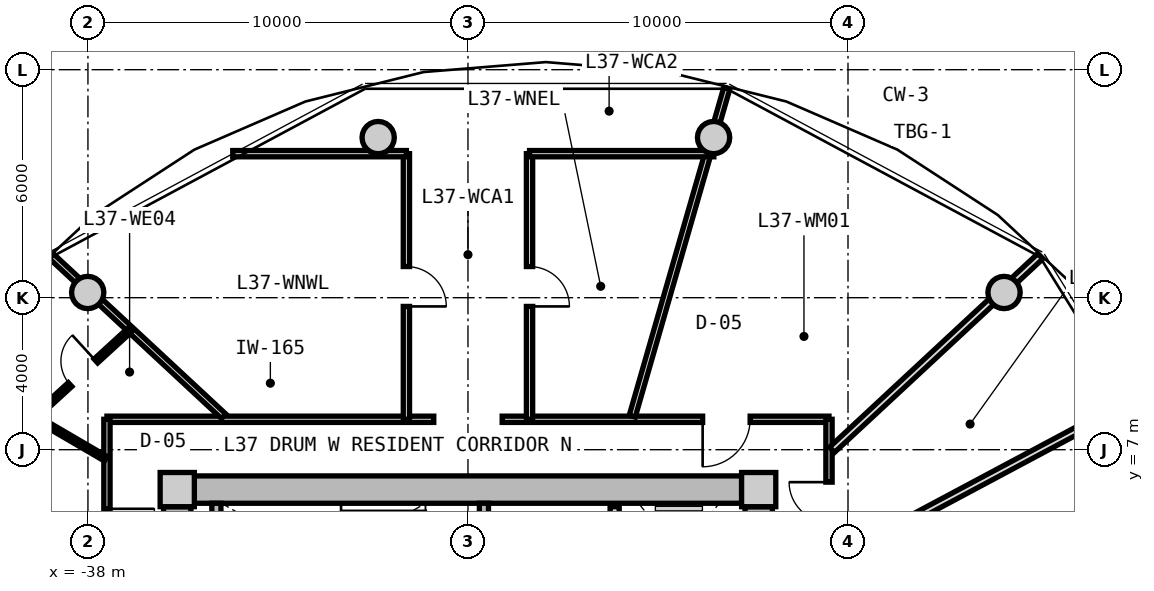
"""IFC4 building model, lengths in metres.
Left out: names, types, materials, properties, quantities, classifications, styles, units other than length and angle.
Written with IfcOpenShell. Run it as: python <this file> out.ifc"""

import sys

from ifc_helpers import new_model, si_unit, direction, frame, frame_2d, origin, origin_2d, place, context, subcontext, project, spatial, rectangle, circle, extrude, source, transform, mapped, element, fill, save


model = new_model("IFC4")
c1 = context("Model", 3, precision=1e-05, world=origin(), true_north=direction((0.0, 1.0)))
c2 = subcontext(c1, "Body", "Model", "MODEL_VIEW")
j1 = project(units=[si_unit("LENGTHUNIT", "METRE"), si_unit("PLANEANGLEUNIT", "RADIAN")], contexts=[c1])
p1 = place(None, origin())
s1 = spatial("IfcSite", under=j1, at=p1, CompositionType="ELEMENT")
p2 = place(p1, origin())
s2 = spatial("IfcBuilding", under=s1, at=p2, CompositionType="ELEMENT")
p3 = place(p2, frame((0.0, 0.0, 120.65)))
s3 = spatial("IfcBuildingStorey", under=s2, at=p3, CompositionType="ELEMENT", Elevation=120.65)
m1 = source(origin(), c2, "Body", "SweptSolid", [
    extrude(rectangle(XDim=0.9, YDim=0.9, at=origin_2d()), origin(), (0.0, 0.0, 1.0), 3.05),
])
for number, where, z_axis, x_axis in (
    (1, (-20.35, 5.95, 0.0), (0.0, 0.0, 1.0), (1.0, 0.0, 0.0)),
    (2, (-35.65, 5.95, 0.0), (0.0, 0.0, 1.0), (1.0, 0.0, 0.0)),
):
    element("IfcColumn", number, at=place(p3, frame(where, z_axis=z_axis, x_axis=x_axis)), inside=s3, PredefinedType="COLUMN", context=c2, shape_type="MappedRepresentation", body=[
        mapped(m1, transform((0.0, 0.0, 0.0), x_axis=(1.0, 0.0, 0.0), y_axis=(0.0, 1.0, 0.0), z_axis=(0.0, 0.0, 1.0), scale=1.0)),
    ])
m2 = source(origin(), c2, "Body", "SweptSolid", [
    extrude(rectangle(XDim=14.4, YDim=0.72, at=frame_2d((7.2, 0.0))), origin(), (0.0, 0.0, 1.0), 2.79),
])
p4 = place(p3, frame((-35.2, 5.95, 0.0), z_axis=(0.0, 0.0, 1.0), x_axis=(1.0, 0.0, 0.0)))
e3 = element("IfcWall", 3, at=p4, inside=s3, PredefinedType="SHEAR", context=c2, shape_type="MappedRepresentation", body=[
    mapped(m2, transform((0.0, 0.0, 0.0), x_axis=(1.0, 0.0, 0.0), y_axis=(0.0, 1.0, 0.0), z_axis=(0.0, 0.0, 1.0), scale=1.0)),
])
m3 = source(origin(), c2, "Body", "SweptSolid", [
    extrude(rectangle(XDim=11.0, YDim=0.72, at=frame_2d((5.5, 0.0))), origin(), (0.0, 0.0, 1.0), 2.79),
])
p5 = place(p3, frame((-35.65, -5.5, 0.0), z_axis=(0.0, 0.0, 1.0), x_axis=(0.0, 1.0, 0.0)))
e4 = element("IfcWall", 4, at=p5, inside=s3, PredefinedType="SHEAR", context=c2, shape_type="MappedRepresentation", body=[
    mapped(m3, transform((0.0, 0.0, 0.0), x_axis=(1.0, 0.0, 0.0), y_axis=(0.0, 1.0, 0.0), z_axis=(0.0, 0.0, 1.0), scale=1.0)),
])
p6 = place(p5, frame((3.8, 0.0, 0.0)))
e5 = element("IfcOpeningElement", 5, at=p6, cuts=e4, PredefinedType="OPENING", context=c2, shape_type="SweptSolid", body=[
    extrude(rectangle(XDim=1.2, YDim=2.15, at=frame_2d((0.6, 1.075))), frame((0.0, 0.37, 0.0), z_axis=(0.0, -1.0, 0.0), x_axis=(1.0, 0.0, 0.0)), (0.0, 0.0, 1.0), 0.74),
])
p7 = place(p3, frame((-20.35, 5.5, 0.0), z_axis=(0.0, 0.0, 1.0), x_axis=(0.0, -1.0, 0.0)))
e6 = element("IfcWall", 6, at=p7, inside=s3, PredefinedType="SHEAR", context=c2, shape_type="MappedRepresentation", body=[
    mapped(m3, transform((0.0, 0.0, 0.0), x_axis=(1.0, 0.0, 0.0), y_axis=(0.0, 1.0, 0.0), z_axis=(0.0, 0.0, 1.0), scale=1.0)),
])
p8 = place(p7, frame((5.65, 0.0, 0.0)))
e7 = element("IfcOpeningElement", 7, at=p8, cuts=e6, PredefinedType="OPENING", context=c2, shape_type="SweptSolid", body=[
    extrude(rectangle(XDim=1.2, YDim=2.15, at=frame_2d((0.6, 1.075))), frame((0.0, 0.37, 0.0), z_axis=(0.0, -1.0, 0.0), x_axis=(1.0, 0.0, 0.0)), (0.0, 0.0, 1.0), 0.74),
])
m4 = source(origin(), c2, "Body", "SweptSolid", [
    extrude(circle(Radius=0.425, at=origin_2d()), origin(), (0.0, 0.0, 1.0), 3.05),
])
for number, where, z_axis, x_axis in (
    (8, (-13.894, 11.137, 0.0), (0.0, 0.0, 1.0), (1.0, 0.0, 0.0)),
    (9, (-21.537, 15.213, 0.0), (0.0, 0.0, 1.0), (1.0, 0.0, 0.0)),
    (10, (-30.363, 15.213, 0.0), (0.0, 0.0, 1.0), (1.0, 0.0, 0.0)),
    (11, (-38.006, 11.137, 0.0), (0.0, 0.0, 1.0), (1.0, 0.0, 0.0)),
):
    element("IfcColumn", number, at=place(p3, frame(where, z_axis=z_axis, x_axis=x_axis)), inside=s3, PredefinedType="COLUMN", context=c2, shape_type="MappedRepresentation", body=[
        mapped(m4, transform((0.0, 0.0, 0.0), x_axis=(1.0, 0.0, 0.0), y_axis=(0.0, 1.0, 0.0), z_axis=(0.0, 0.0, 1.0), scale=1.0)),
    ])
m5 = source(origin(), c2, "Body", "SweptSolid", [
    extrude(rectangle(XDim=3.14, YDim=0.24, at=frame_2d((1.57, 0.0))), origin(), (0.0, 0.0, 1.0), 2.79),
])
p9 = place(p3, frame((-34.62, 2.45, 0.0), z_axis=(0.0, 0.0, 1.0), x_axis=(0.0, 1.0, 0.0)))
e12 = element("IfcWall", 12, at=p9, inside=s3, PredefinedType="PARTITIONING", context=c2, shape_type="MappedRepresentation", body=[
    mapped(m5, transform((0.0, 0.0, 0.0), x_axis=(1.0, 0.0, 0.0), y_axis=(0.0, 1.0, 0.0), z_axis=(0.0, 0.0, 1.0), scale=1.0)),
])
p10 = place(p3, frame((-27.58, 2.45, 0.0), z_axis=(0.0, 0.0, 1.0), x_axis=(0.0, 1.0, 0.0)))
e13 = element("IfcWall", 13, at=p10, inside=s3, PredefinedType="PARTITIONING", context=c2, shape_type="MappedRepresentation", body=[
    mapped(m5, transform((0.0, 0.0, 0.0), x_axis=(1.0, 0.0, 0.0), y_axis=(0.0, 1.0, 0.0), z_axis=(0.0, 0.0, 1.0), scale=1.0)),
])
p11 = place(p10, frame((0.55, 0.0, 0.0)))
e14 = element("IfcOpeningElement", 14, at=p11, cuts=e13, PredefinedType="OPENING", context=c2, shape_type="SweptSolid", body=[
    extrude(rectangle(XDim=1.1, YDim=2.15, at=frame_2d((0.55, 1.075))), frame((0.0, 0.13, 0.0), z_axis=(0.0, -1.0, 0.0), x_axis=(1.0, 0.0, 0.0)), (0.0, 0.0, 1.0), 0.26),
])
m6 = source(origin(), c2, "Body", "SweptSolid", [
    extrude(rectangle(XDim=5.0, YDim=0.24, at=frame_2d((2.5, 0.0))), origin(), (0.0, 0.0, 1.0), 2.775),
])
p12 = place(p3, frame((-24.14, 0.5, 0.0), z_axis=(0.0, 0.0, 1.0), x_axis=(0.0, 1.0, 0.0)))
e15 = element("IfcWall", 15, at=p12, inside=s3, PredefinedType="PARTITIONING", context=c2, shape_type="MappedRepresentation", body=[
    mapped(m6, transform((0.0, 0.0, 0.0), x_axis=(1.0, 0.0, 0.0), y_axis=(0.0, 1.0, 0.0), z_axis=(0.0, 0.0, 1.0), scale=1.0)),
])
p13 = place(p12, frame((3.05, 0.0, 0.0)))
e16 = element("IfcOpeningElement", 16, at=p13, cuts=e15, PredefinedType="OPENING", context=c2, shape_type="SweptSolid", body=[
    extrude(rectangle(XDim=1.3, YDim=2.2, at=frame_2d((0.65, 1.1))), frame((0.0, 0.13, 0.0), z_axis=(0.0, -1.0, 0.0), x_axis=(1.0, 0.0, 0.0)), (0.0, 0.0, 1.0), 0.26),
])
p14 = place(p12, frame((0.55, 0.0, 0.0)))
e17 = element("IfcOpeningElement", 17, at=p14, cuts=e15, PredefinedType="OPENING", context=c2, shape_type="SweptSolid", body=[
    extrude(rectangle(XDim=1.3, YDim=2.2, at=frame_2d((0.65, 1.1))), frame((0.0, 0.13, 0.0), z_axis=(0.0, -1.0, 0.0), x_axis=(1.0, 0.0, 0.0)), (0.0, 0.0, 1.0), 0.26),
])
m7 = source(origin(), c2, "Body", "SweptSolid", [
    extrude(rectangle(XDim=8.6, YDim=0.165, at=frame_2d((4.3, 0.0))), origin(), (0.0, 0.0, 1.0), 2.775),
])
p15 = place(p3, frame((-37.5, 7.8, 0.0), z_axis=(0.0, 0.0, 1.0), x_axis=(1.0, 0.0, 0.0)))
e18 = element("IfcWall", 18, at=p15, inside=s3, PredefinedType="PARTITIONING", context=c2, shape_type="MappedRepresentation", body=[
    mapped(m7, transform((0.0, 0.0, 0.0), x_axis=(1.0, 0.0, 0.0), y_axis=(0.0, 1.0, 0.0), z_axis=(0.0, 0.0, 1.0), scale=1.0)),
])
p16 = place(p3, frame((-27.1, 7.8, 0.0), z_axis=(0.0, 0.0, 1.0), x_axis=(1.0, 0.0, 0.0)))
e19 = element("IfcWall", 19, at=p16, inside=s3, PredefinedType="PARTITIONING", context=c2, shape_type="MappedRepresentation", body=[
    mapped(m7, transform((0.0, 0.0, 0.0), x_axis=(1.0, 0.0, 0.0), y_axis=(0.0, 1.0, 0.0), z_axis=(0.0, 0.0, 1.0), scale=1.0)),
])
p17 = place(p16, frame((5.275, 0.0, 0.0)))
e20 = element("IfcOpeningElement", 20, at=p17, cuts=e19, PredefinedType="OPENING", context=c2, shape_type="SweptSolid", body=[
    extrude(rectangle(XDim=1.25, YDim=2.2, at=frame_2d((0.625, 1.1))), frame((0.0, 0.093, 0.0), z_axis=(0.0, -1.0, 0.0), x_axis=(1.0, 0.0, 0.0)), (0.0, 0.0, 1.0), 0.185),
])
m8 = source(origin(), c2, "Body", "SweptSolid", [
    extrude(rectangle(XDim=15.6, YDim=0.165, at=frame_2d((7.8, 0.0))), origin(), (0.0, 0.0, 1.0), 2.775),
])
p18 = place(p3, frame((-37.5, -7.8, 0.0), z_axis=(0.0, 0.0, 1.0), x_axis=(0.0, 1.0, 0.0)))
e21 = element("IfcWall", 21, at=p18, inside=s3, PredefinedType="PARTITIONING", context=c2, shape_type="MappedRepresentation", body=[
    mapped(m8, transform((0.0, 0.0, 0.0), x_axis=(1.0, 0.0, 0.0), y_axis=(0.0, 1.0, 0.0), z_axis=(0.0, 0.0, 1.0), scale=1.0)),
])
p19 = place(p18, frame((11.994, 0.0, 0.0)))
e22 = element("IfcOpeningElement", 22, at=p19, cuts=e21, PredefinedType="OPENING", context=c2, shape_type="SweptSolid", body=[
    extrude(rectangle(XDim=1.25, YDim=2.2, at=frame_2d((0.625, 1.1))), frame((0.0, 0.093, 0.0), z_axis=(0.0, -1.0, 0.0), x_axis=(1.0, 0.0, 0.0)), (0.0, 0.0, 1.0), 0.185),
])
p20 = place(p18, frame((7.984, 0.0, 0.0)))
e23 = element("IfcOpeningElement", 23, at=p20, cuts=e21, PredefinedType="OPENING", context=c2, shape_type="SweptSolid", body=[
    extrude(rectangle(XDim=1.05, YDim=2.15, at=frame_2d((0.525, 1.075))), frame((0.0, 0.093, 0.0), z_axis=(0.0, -1.0, 0.0), x_axis=(1.0, 0.0, 0.0)), (0.0, 0.0, 1.0), 0.185),
])
p21 = place(p18, frame((5.777, 0.0, 0.0)))
e24 = element("IfcOpeningElement", 24, at=p21, cuts=e21, PredefinedType="OPENING", context=c2, shape_type="SweptSolid", body=[
    extrude(rectangle(XDim=1.05, YDim=2.15, at=frame_2d((0.525, 1.075))), frame((0.0, 0.093, 0.0), z_axis=(0.0, -1.0, 0.0), x_axis=(1.0, 0.0, 0.0)), (0.0, 0.0, 1.0), 0.185),
])
p22 = place(p18, frame((2.676, 0.0, 0.0)))
e25 = element("IfcOpeningElement", 25, at=p22, cuts=e21, PredefinedType="OPENING", context=c2, shape_type="SweptSolid", body=[
    extrude(rectangle(XDim=1.05, YDim=2.15, at=frame_2d((0.525, 1.075))), frame((0.0, 0.093, 0.0), z_axis=(0.0, -1.0, 0.0), x_axis=(1.0, 0.0, 0.0)), (0.0, 0.0, 1.0), 0.185),
])
p23 = place(p3, frame((-18.5, 7.8, 0.0), z_axis=(0.0, 0.0, 1.0), x_axis=(0.0, -1.0, 0.0)))
e26 = element("IfcWall", 26, at=p23, inside=s3, PredefinedType="PARTITIONING", context=c2, shape_type="MappedRepresentation", body=[
    mapped(m8, transform((0.0, 0.0, 0.0), x_axis=(1.0, 0.0, 0.0), y_axis=(0.0, 1.0, 0.0), z_axis=(0.0, 0.0, 1.0), scale=1.0)),
])
p24 = place(p23, frame((12.002, 0.0, 0.0)))
e27 = element("IfcOpeningElement", 27, at=p24, cuts=e26, PredefinedType="OPENING", context=c2, shape_type="SweptSolid", body=[
    extrude(rectangle(XDim=1.05, YDim=2.15, at=frame_2d((0.525, 1.075))), frame((0.0, 0.093, 0.0), z_axis=(0.0, -1.0, 0.0), x_axis=(1.0, 0.0, 0.0)), (0.0, 0.0, 1.0), 0.185),
])
p25 = place(p23, frame((10.211, 0.0, 0.0)))
e28 = element("IfcOpeningElement", 28, at=p25, cuts=e26, PredefinedType="OPENING", context=c2, shape_type="SweptSolid", body=[
    extrude(rectangle(XDim=1.05, YDim=2.15, at=frame_2d((0.525, 1.075))), frame((0.0, 0.093, 0.0), z_axis=(0.0, -1.0, 0.0), x_axis=(1.0, 0.0, 0.0)), (0.0, 0.0, 1.0), 0.185),
])
p26 = place(p23, frame((7.722, 0.0, 0.0)))
e29 = element("IfcOpeningElement", 29, at=p26, cuts=e26, PredefinedType="OPENING", context=c2, shape_type="SweptSolid", body=[
    extrude(rectangle(XDim=1.05, YDim=2.15, at=frame_2d((0.525, 1.075))), frame((0.0, 0.093, 0.0), z_axis=(0.0, -1.0, 0.0), x_axis=(1.0, 0.0, 0.0)), (0.0, 0.0, 1.0), 0.185),
])
p27 = place(p23, frame((6.291, 0.0, 0.0)))
e30 = element("IfcOpeningElement", 30, at=p27, cuts=e26, PredefinedType="OPENING", context=c2, shape_type="SweptSolid", body=[
    extrude(rectangle(XDim=1.05, YDim=2.15, at=frame_2d((0.525, 1.075))), frame((0.0, 0.093, 0.0), z_axis=(0.0, -1.0, 0.0), x_axis=(1.0, 0.0, 0.0)), (0.0, 0.0, 1.0), 0.185),
])
p28 = place(p23, frame((4.296, 0.0, 0.0)))
e31 = element("IfcOpeningElement", 31, at=p28, cuts=e26, PredefinedType="OPENING", context=c2, shape_type="SweptSolid", body=[
    extrude(rectangle(XDim=1.05, YDim=2.15, at=frame_2d((0.525, 1.075))), frame((0.0, 0.093, 0.0), z_axis=(0.0, -1.0, 0.0), x_axis=(1.0, 0.0, 0.0)), (0.0, 0.0, 1.0), 0.185),
])
p29 = place(p23, frame((1.654, 0.0, 0.0)))
e32 = element("IfcOpeningElement", 32, at=p29, cuts=e26, PredefinedType="OPENING", context=c2, shape_type="SweptSolid", body=[
    extrude(rectangle(XDim=1.05, YDim=2.15, at=frame_2d((0.525, 1.075))), frame((0.0, 0.093, 0.0), z_axis=(0.0, -1.0, 0.0), x_axis=(1.0, 0.0, 0.0)), (0.0, 0.0, 1.0), 0.185),
])
m9 = source(origin(), c2, "Body", "SweptSolid", [
    extrude(rectangle(XDim=8.989, YDim=0.165, at=frame_2d((4.495, 0.0))), origin(), (0.0, 0.0, 1.0), 2.275),
])
p30 = place(p3, frame((-23.678, 7.88, 0.0), z_axis=(0.0, 0.0, 1.0), x_axis=(0.27702323008, 0.960863221274, 0.0)))
e33 = element("IfcWall", 33, at=p30, inside=s3, PredefinedType="PARTITIONING", context=c2, shape_type="MappedRepresentation", body=[
    mapped(m9, transform((0.0, 0.0, 0.0), x_axis=(1.0, 0.0, 0.0), y_axis=(0.0, 1.0, 0.0), z_axis=(0.0, 0.0, 1.0), scale=1.0)),
])
m10 = source(origin(), c2, "Body", "SweptSolid", [
    extrude(rectangle(XDim=6.187, YDim=0.165, at=frame_2d((3.093, 0.0))), origin(), (0.0, 0.0, 1.0), 2.275),
])
p31 = place(p3, frame((-34.429, 7.88, 0.0), z_axis=(0.0, 0.0, 1.0), x_axis=(-0.732501077882, 0.680765870841, 0.0)))
e34 = element("IfcWall", 34, at=p31, inside=s3, PredefinedType="PARTITIONING", context=c2, shape_type="MappedRepresentation", body=[
    mapped(m10, transform((0.0, 0.0, 0.0), x_axis=(1.0, 0.0, 0.0), y_axis=(0.0, 1.0, 0.0), z_axis=(0.0, 0.0, 1.0), scale=1.0)),
])
m11 = source(origin(), c2, "Body", "SweptSolid", [
    extrude(rectangle(XDim=6.99, YDim=0.165, at=frame_2d((3.495, 0.0))), origin(), (0.0, 0.0, 1.0), 2.275),
])
p32 = place(p3, frame((-29.62, 7.8, 0.0), z_axis=(0.0, 0.0, 1.0), x_axis=(0.0, 1.0, 0.0)))
e35 = element("IfcWall", 35, at=p32, inside=s3, PredefinedType="PARTITIONING", context=c2, shape_type="MappedRepresentation", body=[
    mapped(m11, transform((0.0, 0.0, 0.0), x_axis=(1.0, 0.0, 0.0), y_axis=(0.0, 1.0, 0.0), z_axis=(0.0, 0.0, 1.0), scale=1.0)),
])
p33 = place(p32, frame((2.97, 0.0, 0.0)))
e36 = element("IfcOpeningElement", 36, at=p33, cuts=e35, PredefinedType="OPENING", context=c2, shape_type="SweptSolid", body=[
    extrude(rectangle(XDim=1.05, YDim=2.15, at=frame_2d((0.525, 1.075))), frame((0.0, 0.093, 0.0), z_axis=(0.0, -1.0, 0.0), x_axis=(1.0, 0.0, 0.0)), (0.0, 0.0, 1.0), 0.185),
])
m12 = source(origin(), c2, "Body", "SweptSolid", [
    extrude(rectangle(XDim=4.569, YDim=0.165, at=frame_2d((2.285, 0.0))), origin(), (0.0, 0.0, 1.0), 2.775),
])
p34 = place(p3, frame((-34.189, 14.79, 0.0), z_axis=(0.0, 0.0, 1.0), x_axis=(1.0, 0.0, 0.0)))
e37 = element("IfcWall", 37, at=p34, inside=s3, PredefinedType="PARTITIONING", context=c2, shape_type="MappedRepresentation", body=[
    mapped(m12, transform((0.0, 0.0, 0.0), x_axis=(1.0, 0.0, 0.0), y_axis=(0.0, 1.0, 0.0), z_axis=(0.0, 0.0, 1.0), scale=1.0)),
])
m13 = source(origin(), c2, "Body", "SweptSolid", [
    extrude(rectangle(XDim=6.99, YDim=0.165, at=frame_2d((3.495, 0.0))), origin(), (0.0, 0.0, 1.0), 2.775),
])
p35 = place(p3, frame((-26.38, 7.8, 0.0), z_axis=(0.0, 0.0, 1.0), x_axis=(0.0, 1.0, 0.0)))
e38 = element("IfcWall", 38, at=p35, inside=s3, PredefinedType="PARTITIONING", context=c2, shape_type="MappedRepresentation", body=[
    mapped(m13, transform((0.0, 0.0, 0.0), x_axis=(1.0, 0.0, 0.0), y_axis=(0.0, 1.0, 0.0), z_axis=(0.0, 0.0, 1.0), scale=1.0)),
])
p36 = place(p35, frame((2.97, 0.0, 0.0)))
e39 = element("IfcOpeningElement", 39, at=p36, cuts=e38, PredefinedType="OPENING", context=c2, shape_type="SweptSolid", body=[
    extrude(rectangle(XDim=1.05, YDim=2.15, at=frame_2d((0.525, 1.075))), frame((0.0, 0.093, 0.0), z_axis=(0.0, -1.0, 0.0), x_axis=(1.0, 0.0, 0.0)), (0.0, 0.0, 1.0), 0.185),
])
m14 = source(origin(), c2, "Body", "SweptSolid", [
    extrude(rectangle(XDim=4.851, YDim=0.165, at=frame_2d((2.425, 0.0))), origin(), (0.0, 0.0, 1.0), 2.775),
])
p37 = place(p3, frame((-26.38, 14.79, 0.0), z_axis=(0.0, 0.0, 1.0), x_axis=(1.0, 0.0, 0.0)))
e40 = element("IfcWall", 40, at=p37, inside=s3, PredefinedType="PARTITIONING", context=c2, shape_type="MappedRepresentation", body=[
    mapped(m14, transform((0.0, 0.0, 0.0), x_axis=(1.0, 0.0, 0.0), y_axis=(0.0, 1.0, 0.0), z_axis=(0.0, 0.0, 1.0), scale=1.0)),
])
m15 = source(origin(), c2, "Body", "SweptSolid", [
    extrude(rectangle(XDim=2.172, YDim=0.14, at=frame_2d((1.086, 0.0))), origin(), (0.0, 0.0, 1.0), 2.775),
])
p38 = place(p3, frame((-37.53, 6.762, 0.0), z_axis=(0.0, 0.0, 1.0), x_axis=(-0.863562702562, 0.504241468688, 0.0)))
e41 = element("IfcWall", 41, at=p38, inside=s3, PredefinedType="PARTITIONING", context=c2, shape_type="MappedRepresentation", body=[
    mapped(m15, transform((0.0, 0.0, 0.0), x_axis=(1.0, 0.0, 0.0), y_axis=(0.0, 1.0, 0.0), z_axis=(0.0, 0.0, 1.0), scale=1.0)),
])
m16 = source(origin(), c2, "Body", "SweptSolid", [
    extrude(rectangle(XDim=3.457, YDim=0.14, at=frame_2d((1.729, 0.0))), origin(), (0.0, 0.0, 1.0), 2.775),
])
p39 = place(p3, frame((-39.405, 7.857, 0.0), z_axis=(0.0, 0.0, 1.0), x_axis=(0.737567375492, 0.675273549467, 0.0)))
e42 = element("IfcWall", 42, at=p39, inside=s3, PredefinedType="PARTITIONING", context=c2, shape_type="MappedRepresentation", body=[
    mapped(m16, transform((0.0, 0.0, 0.0), x_axis=(1.0, 0.0, 0.0), y_axis=(0.0, 1.0, 0.0), z_axis=(0.0, 0.0, 1.0), scale=1.0)),
])
p40 = place(p39, frame((1.268, 0.0, 0.0)))
e43 = element("IfcOpeningElement", 43, at=p40, cuts=e42, PredefinedType="OPENING", context=c2, shape_type="SweptSolid", body=[
    extrude(rectangle(XDim=0.92, YDim=2.1, at=frame_2d((0.46, 1.05))), frame((0.0, 0.08, 0.0), z_axis=(0.0, -1.0, 0.0), x_axis=(1.0, 0.0, 0.0)), (0.0, 0.0, 1.0), 0.16),
])
m17 = source(origin(), c2, "Body", "SweptSolid", [
    extrude(rectangle(XDim=7.482, YDim=0.19, at=frame_2d((3.741, 0.0))), origin(), (0.0, 0.0, 1.0), 2.275),
])
p41 = place(p3, frame((-18.42, 6.998, 0.0), z_axis=(0.0, 0.0, 1.0), x_axis=(0.732508698043, 0.680757671489, 0.0)))
e44 = element("IfcWall", 44, at=p41, inside=s3, PredefinedType="PARTITIONING", context=c2, shape_type="MappedRepresentation", body=[
    mapped(m17, transform((0.0, 0.0, 0.0), x_axis=(1.0, 0.0, 0.0), y_axis=(0.0, 1.0, 0.0), z_axis=(0.0, 0.0, 1.0), scale=1.0)),
])
m18 = source(origin(), c2, "Body", "SweptSolid", [
    extrude(rectangle(XDim=8.968, YDim=0.19, at=frame_2d((4.484, 0.0))), origin(), (0.0, 0.0, 1.0), 2.775),
])
p42 = place(p3, frame((-18.47, 4.036, 0.0), z_axis=(0.0, 0.0, 1.0), x_axis=(0.882202936563, 0.47086938605, 0.0)))
e45 = element("IfcWall", 45, at=p42, inside=s3, PredefinedType="PARTITIONING", context=c2, shape_type="MappedRepresentation", body=[
    mapped(m18, transform((0.0, 0.0, 0.0), x_axis=(1.0, 0.0, 0.0), y_axis=(0.0, 1.0, 0.0), z_axis=(0.0, 0.0, 1.0), scale=1.0)),
])
m19 = source(origin(), c2, "Body", "SweptSolid", [
    extrude(rectangle(XDim=1.05, YDim=2.15, at=frame_2d((0.525, 1.075))), frame((0.0, 0.025, 0.0), z_axis=(0.0, -1.0, 0.0), x_axis=(1.0, 0.0, 0.0)), (0.0, 0.0, 1.0), 0.05),
])
p43 = place(p33, frame((1.05, 0.0, 0.0), z_axis=(0.0, 0.0, 1.0), x_axis=(-1.0, 0.0, 0.0)))
e46 = element("IfcDoor", 46, at=p43, inside=s3, OperationType="SINGLE_SWING_RIGHT", PredefinedType="DOOR", context=c2, shape_type="MappedRepresentation", body=[
    mapped(m19, transform((0.0, 0.0, 0.0), x_axis=(1.0, 0.0, 0.0), y_axis=(0.0, 1.0, 0.0), z_axis=(0.0, 0.0, 1.0), scale=1.0)),
])
fill(e36, e46)
p44 = place(p36, frame((1.05, 0.0, 0.0), z_axis=(0.0, 0.0, 1.0), x_axis=(-1.0, 0.0, 0.0)))
e47 = element("IfcDoor", 47, at=p44, inside=s3, OperationType="SINGLE_SWING_RIGHT", PredefinedType="DOOR", context=c2, shape_type="MappedRepresentation", body=[
    mapped(m19, transform((0.0, 0.0, 0.0), x_axis=(1.0, 0.0, 0.0), y_axis=(0.0, 1.0, 0.0), z_axis=(0.0, 0.0, 1.0), scale=1.0)),
])
fill(e39, e47)
m20 = source(origin(), c2, "Body", "SweptSolid", [
    extrude(rectangle(XDim=1.25, YDim=2.2, at=frame_2d((0.625, 1.1))), frame((0.0, 0.025, 0.0), z_axis=(0.0, -1.0, 0.0), x_axis=(1.0, 0.0, 0.0)), (0.0, 0.0, 1.0), 0.05),
])
p45 = place(p19, frame((1.25, 0.0, 0.0), z_axis=(0.0, 0.0, 1.0), x_axis=(-1.0, 0.0, 0.0)))
e48 = element("IfcDoor", 48, at=p45, inside=s3, OperationType="SINGLE_SWING_LEFT", PredefinedType="DOOR", context=c2, shape_type="MappedRepresentation", body=[
    mapped(m20, transform((0.0, 0.0, 0.0), x_axis=(1.0, 0.0, 0.0), y_axis=(0.0, 1.0, 0.0), z_axis=(0.0, 0.0, 1.0), scale=1.0)),
])
fill(e22, e48)
m21 = source(origin(), c2, "Body", "SweptSolid", [
    extrude(rectangle(XDim=0.92, YDim=2.1, at=frame_2d((0.46, 1.05))), frame((0.0, 0.025, 0.0), z_axis=(0.0, -1.0, 0.0), x_axis=(1.0, 0.0, 0.0)), (0.0, 0.0, 1.0), 0.05),
])
p46 = place(p40, origin())
e49 = element("IfcDoor", 49, at=p46, inside=s3, OperationType="SINGLE_SWING_RIGHT", PredefinedType="DOOR", context=c2, shape_type="MappedRepresentation", body=[
    mapped(m21, transform((0.0, 0.0, 0.0), x_axis=(1.0, 0.0, 0.0), y_axis=(0.0, 1.0, 0.0), z_axis=(0.0, 0.0, 1.0), scale=1.0)),
])
fill(e43, e49)
p47 = place(p29, frame((1.05, 0.0, 0.0), z_axis=(0.0, 0.0, 1.0), x_axis=(-1.0, 0.0, 0.0)))
e50 = element("IfcDoor", 50, at=p47, inside=s3, OperationType="SINGLE_SWING_RIGHT", PredefinedType="DOOR", context=c2, shape_type="MappedRepresentation", body=[
    mapped(m19, transform((0.0, 0.0, 0.0), x_axis=(1.0, 0.0, 0.0), y_axis=(0.0, 1.0, 0.0), z_axis=(0.0, 0.0, 1.0), scale=1.0)),
])
fill(e32, e50)
p48 = place(p17, frame((1.25, 0.0, 0.0), z_axis=(0.0, 0.0, 1.0), x_axis=(-1.0, 0.0, 0.0)))
e51 = element("IfcDoor", 51, at=p48, inside=s3, OperationType="SINGLE_SWING_RIGHT", PredefinedType="DOOR", context=c2, shape_type="MappedRepresentation", body=[
    mapped(m20, transform((0.0, 0.0, 0.0), x_axis=(1.0, 0.0, 0.0), y_axis=(0.0, 1.0, 0.0), z_axis=(0.0, 0.0, 1.0), scale=1.0)),
])
fill(e20, e51)
save(model, sys.argv[1])
